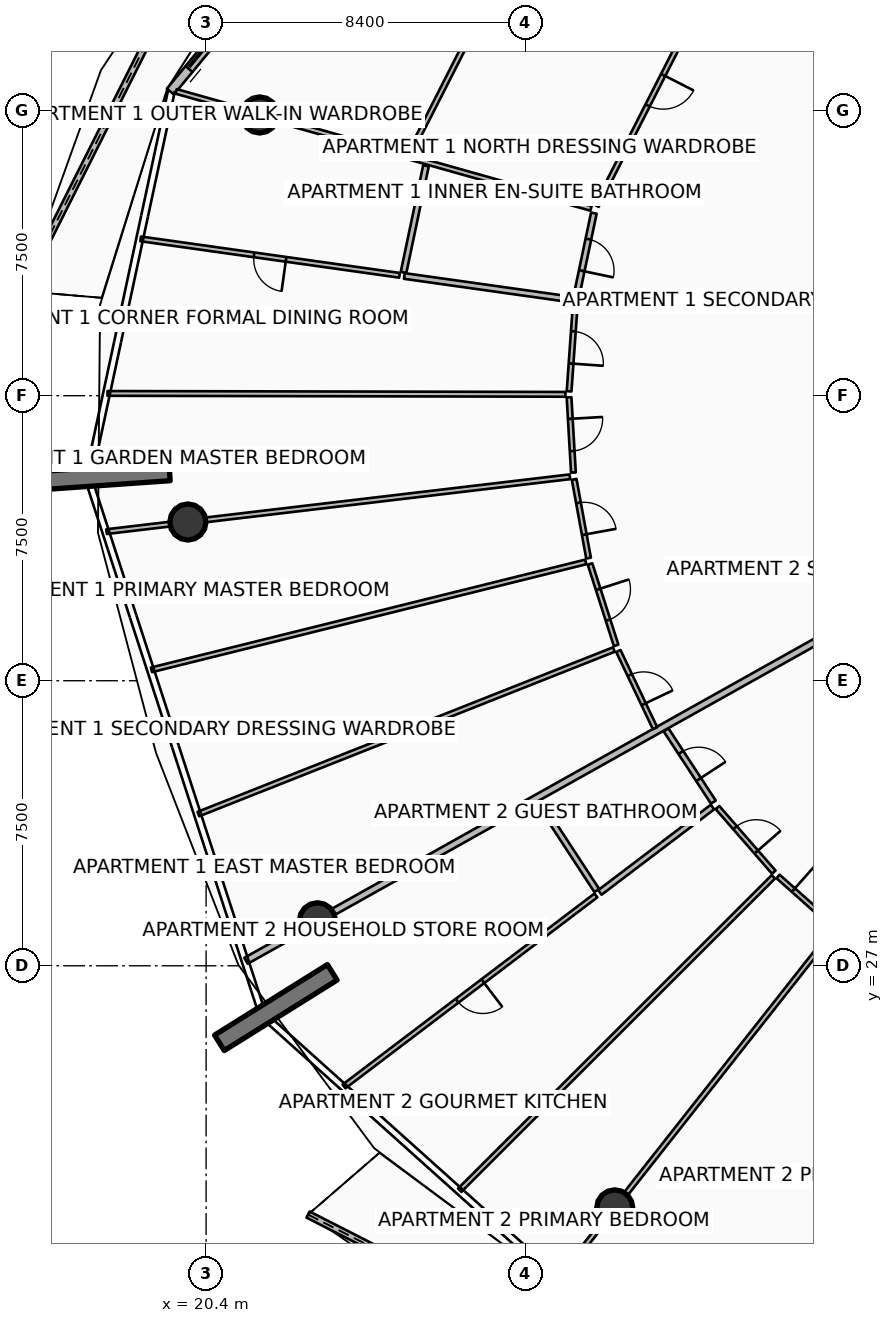
"""IFC4 building model, lengths in metres.
Left out: names, types, materials, properties, quantities, classifications, styles, units other than length and angle.
Written with IfcOpenShell. Run it as: python <this file> out.ifc"""

import sys

from ifc_helpers import new_model, si_unit, direction, frame, frame_2d, origin, origin_2d, place, context, subcontext, project, spatial, polyline, rectangle, circle, outline, extrude, element, fill, save


model = new_model("IFC4")
c1 = context("Model", 3, precision=1e-05, world=origin(), true_north=direction((0.0, 1.0)))
c2 = subcontext(c1, "Body", "Model", "MODEL_VIEW")
j1 = project(units=[si_unit("LENGTHUNIT", "METRE"), si_unit("PLANEANGLEUNIT", "RADIAN")], contexts=[c1])
p1 = place(None, origin())
s1 = spatial("IfcSite", under=j1, at=p1, CompositionType="ELEMENT")
p2 = place(p1, origin())
s2 = spatial("IfcBuilding", under=s1, at=p2, CompositionType="ELEMENT")
p3 = place(p2, frame((0.0, 0.0, 252.1)))
s3 = spatial("IfcBuildingStorey", under=s2, at=p3, CompositionType="ELEMENT", Elevation=252.1)
p4 = place(p3, frame((19.438, 40.003, 0.0), z_axis=(0.0, 0.0, 1.0), x_axis=(-0.997563824095, -0.069759707979, 0.0)))
e1 = element("IfcWall", 1, at=p4, inside=s3, PredefinedType="SOLIDWALL", context=c2, shape_type="SweptSolid", body=[
    extrude(rectangle(XDim=3.5, YDim=0.48, at=frame_2d((1.75, 0.0))), origin(), (0.0, 0.0, 1.0), 3.85),
])
p5 = place(p3, frame((23.719, 26.827, 0.0), z_axis=(0.0, 0.0, 1.0), x_axis=(-0.848033572426, -0.529942506352, 0.0)))
e2 = element("IfcWall", 2, at=p5, inside=s3, PredefinedType="SOLIDWALL", context=c2, shape_type="SweptSolid", body=[
    extrude(rectangle(XDim=3.5, YDim=0.48, at=frame_2d((1.75, 0.0))), origin(), (0.0, 0.0, 1.0), 3.85),
])
for number, where, z_axis, x_axis in (
    (3, (21.809, 49.387, 0.0), (0.0, 0.0, 1.0), (1.0, 0.0, 0.0)),
    (4, (19.92, 38.677, 0.0), (0.0, 0.0, 1.0), (1.0, 0.0, 0.0)),
    (5, (23.33, 28.184, 0.0), (0.0, 0.0, 1.0), (1.0, 0.0, 0.0)),
    (6, (31.153, 20.629, 0.0), (0.0, 0.0, 1.0), (1.0, 0.0, 0.0)),
):
    element("IfcColumn", number, at=place(p3, frame(where, z_axis=z_axis, x_axis=x_axis)), inside=s3, PredefinedType="COLUMN", context=c2, shape_type="SweptSolid", body=[
        extrude(circle(Radius=0.475, at=origin_2d()), origin(), (0.0, 0.0, 1.0), 3.59),
    ])
p6 = place(p3, frame((21.009, 55.618, 0.0), z_axis=(0.0, 0.0, 1.0), x_axis=(-0.449276289184, -0.893392867655, 0.0)))
e7 = element("IfcWall", 7, at=p6, inside=s3, PredefinedType="PARAPET", context=c2, shape_type="SweptSolid", body=[
    extrude(outline(polyline([(0.0, 0.0), (12.16, 0.0), (12.16, 1.483), (6.08, 1.284), (0.0, 1.148), (0.0, 0.0)])), frame((0.0, 0.09, 0.0), z_axis=(0.0, -1.0, 0.0), x_axis=(1.0, 0.0, 0.0)), (0.0, 0.0, 1.0), 0.18),
])
p7 = place(p3, frame((23.083, 20.454, 0.0), z_axis=(0.0, 0.0, 1.0), x_axis=(0.890886303028, -0.454226369861, 0.0)))
e8 = element("IfcWall", 8, at=p7, inside=s3, PredefinedType="PARAPET", context=c2, shape_type="SweptSolid", body=[
    extrude(outline(polyline([(0.0, 0.0), (12.3, 0.0), (12.3, 1.348), (6.15, 1.562), (0.0, 1.747), (0.0, 0.0)])), frame((0.0, 0.09, 0.0), z_axis=(0.0, -1.0, 0.0), x_axis=(1.0, 0.0, 0.0)), (0.0, 0.0, 1.0), 0.18),
])
p8 = place(p3, frame((26.742, 58.822, 0.0), z_axis=(0.0, 0.0, 1.0), x_axis=(-0.636680093065, -0.771128043255, 0.0)))
e9 = element("IfcWall", 9, at=p8, inside=s3, PredefinedType="SOLIDWALL", context=c2, shape_type="SweptSolid", body=[
    extrude(rectangle(XDim=11.438, YDim=0.24, at=frame_2d((5.719, 0.0))), origin(), (0.0, 0.0, 1.0), 2.54),
])
p9 = place(p8, frame((9.218, 0.0, 0.0)))
e10 = element("IfcOpeningElement", 10, at=p9, cuts=e9, PredefinedType="OPENING", context=c2, shape_type="SweptSolid", body=[
    extrude(rectangle(XDim=1.45, YDim=2.15, at=frame_2d((0.725, 1.075))), frame((0.0, 0.13, 0.0), z_axis=(0.0, -1.0, 0.0), x_axis=(1.0, 0.0, 0.0)), (0.0, 0.0, 1.0), 0.26),
])
p10 = place(p8, frame((0.28, 0.0, 0.65)))
e11 = element("IfcOpeningElement", 11, at=p10, cuts=e9, PredefinedType="OPENING", context=c2, shape_type="SweptSolid", body=[
    extrude(rectangle(XDim=1.6, YDim=1.5, at=frame_2d((0.8, 0.75))), frame((0.0, 0.13, 0.0), z_axis=(0.0, -1.0, 0.0), x_axis=(1.0, 0.0, 0.0)), (0.0, 0.0, 1.0), 0.26),
])
p11 = place(p3, frame((37.054, 35.87, 0.0), z_axis=(0.0, 0.0, 1.0), x_axis=(-0.872490186067, -0.488631635506, 0.0)))
e12 = element("IfcWall", 12, at=p11, inside=s3, PredefinedType="PARTITIONING", context=c2, shape_type="SweptSolid", body=[
    extrude(rectangle(XDim=17.884, YDim=0.18, at=frame_2d((8.942, 0.0))), origin(), (0.0, 0.0, 1.0), 2.957),
])
p12 = place(p3, frame((33.772, 53.079, 0.0), z_axis=(0.0, 0.0, 1.0), x_axis=(-0.454012060349, -0.890995538181, 0.0)))
e13 = element("IfcWall", 13, at=p12, inside=s3, PredefinedType="PARTITIONING", context=c2, shape_type="SweptSolid", body=[
    extrude(rectangle(XDim=6.824, YDim=0.125, at=frame_2d((3.412, 0.0))), origin(), (0.0, 0.0, 1.0), 2.957),
])
p13 = place(p12, frame((2.962, 0.0, 0.0)))
e14 = element("IfcOpeningElement", 14, at=p13, cuts=e13, PredefinedType="OPENING", context=c2, shape_type="SweptSolid", body=[
    extrude(rectangle(XDim=0.9, YDim=2.08, at=frame_2d((0.45, 1.04))), frame((0.0, 0.073, 0.0), z_axis=(0.0, -1.0, 0.0), x_axis=(1.0, 0.0, 0.0)), (0.0, 0.0, 1.0), 0.145),
])
p14 = place(p3, frame((29.764, 56.239, 0.0), z_axis=(0.0, 0.0, 1.0), x_axis=(-0.453980126594, -0.891011809494, 0.0)))
e15 = element("IfcWall", 15, at=p14, inside=s3, PredefinedType="PARTITIONING", context=c2, shape_type="SweptSolid", body=[
    extrude(rectangle(XDim=8.816, YDim=0.125, at=frame_2d((4.408, 0.0))), origin(), (0.0, 0.0, 1.0), 2.957),
])
p15 = place(p14, frame((3.958, 0.0, 0.0)))
e16 = element("IfcOpeningElement", 16, at=p15, cuts=e15, PredefinedType="OPENING", context=c2, shape_type="SweptSolid", body=[
    extrude(rectangle(XDim=0.9, YDim=2.08, at=frame_2d((0.45, 1.04))), frame((0.0, 0.073, 0.0), z_axis=(0.0, -1.0, 0.0), x_axis=(1.0, 0.0, 0.0)), (0.0, 0.0, 1.0), 0.145),
])
p16 = place(p3, frame((30.528, 46.928, 0.0), z_axis=(0.0, 0.0, 1.0), x_axis=(-0.962454146261, 0.271444315367, 0.0)))
e17 = element("IfcWall", 17, at=p16, inside=s3, PredefinedType="PARTITIONING", context=c2, shape_type="SweptSolid", body=[
    extrude(rectangle(XDim=11.342, YDim=0.125, at=frame_2d((5.671, 0.0))), origin(), (0.0, 0.0, 1.0), 2.957),
])
p17 = place(p3, frame((30.603, 46.803, 0.0), z_axis=(0.0, 0.0, 1.0), x_axis=(-0.205906433606, -0.978571683935, 0.0)))
e18 = element("IfcWall", 18, at=p17, inside=s3, PredefinedType="PARTITIONING", context=c2, shape_type="SweptSolid", body=[
    extrude(rectangle(XDim=2.247, YDim=0.15, at=frame_2d((1.124, 0.0))), origin(), (0.0, 0.0, 1.0), 2.957),
])
p18 = place(p17, frame((0.698, 0.0, 0.0)))
e19 = element("IfcOpeningElement", 19, at=p18, cuts=e18, PredefinedType="OPENING", context=c2, shape_type="SweptSolid", body=[
    extrude(rectangle(XDim=0.85, YDim=2.06, at=frame_2d((0.425, 1.03))), frame((0.0, 0.085, 0.0), z_axis=(0.0, -1.0, 0.0), x_axis=(1.0, 0.0, 0.0)), (0.0, 0.0, 1.0), 0.17),
])
p19 = place(p3, frame((26.186, 48.049, 0.0), z_axis=(0.0, 0.0, 1.0), x_axis=(-0.205851663269, -0.97858320685, 0.0)))
e20 = element("IfcWall", 20, at=p19, inside=s3, PredefinedType="PARTITIONING", context=c2, shape_type="SweptSolid", body=[
    extrude(rectangle(XDim=2.866, YDim=0.15, at=frame_2d((1.433, 0.0))), origin(), (0.0, 0.0, 1.0), 2.957),
])
p20 = place(p3, frame((30.033, 44.528, 0.0), z_axis=(0.0, 0.0, 1.0), x_axis=(-0.990248320871, 0.139313542101, 0.0)))
e21 = element("IfcWall", 21, at=p20, inside=s3, PredefinedType="PARTITIONING", context=c2, shape_type="SweptSolid", body=[
    extrude(rectangle(XDim=4.46, YDim=0.15, at=frame_2d((2.23, 0.0))), origin(), (0.0, 0.0, 1.0), 3.03),
])
p21 = place(p3, frame((25.488, 45.168, 0.0), z_axis=(0.0, 0.0, 1.0), x_axis=(-0.990239896804, 0.139373407717, 0.0)))
e22 = element("IfcWall", 22, at=p21, inside=s3, PredefinedType="PARTITIONING", context=c2, shape_type="SweptSolid", body=[
    extrude(rectangle(XDim=6.877, YDim=0.125, at=frame_2d((3.438, 0.0))), origin(), (0.0, 0.0, 1.0), 3.03),
])
p22 = place(p21, frame((3.014, 0.0, 0.0)))
e23 = element("IfcOpeningElement", 23, at=p22, cuts=e22, PredefinedType="OPENING", context=c2, shape_type="SweptSolid", body=[
    extrude(rectangle(XDim=0.85, YDim=2.06, at=frame_2d((0.425, 1.03))), frame((0.0, 0.073, 0.0), z_axis=(0.0, -1.0, 0.0), x_axis=(1.0, 0.0, 0.0)), (0.0, 0.0, 1.0), 0.145),
])
p23 = place(p3, frame((29.856, 42.036, 0.0), z_axis=(0.0, 0.0, 1.0), x_axis=(-0.999998028993, 0.001985449601, 0.0)))
e24 = element("IfcWall", 24, at=p23, inside=s3, PredefinedType="PARTITIONING", context=c2, shape_type="SweptSolid", body=[
    extrude(rectangle(XDim=12.051, YDim=0.125, at=frame_2d((6.025, 0.0))), origin(), (0.0, 0.0, 1.0), 3.03),
])
p24 = place(p3, frame((30.116, 44.426, 0.0), z_axis=(0.0, 0.0, 1.0), x_axis=(-0.07082759095, -0.997488572546, 0.0)))
e25 = element("IfcWall", 25, at=p24, inside=s3, PredefinedType="PARTITIONING", context=c2, shape_type="SweptSolid", body=[
    extrude(rectangle(XDim=2.316, YDim=0.125, at=frame_2d((1.158, 0.0))), origin(), (0.0, 0.0, 1.0), 3.03),
])
p25 = place(p24, frame((0.733, 0.0, 0.0)))
e26 = element("IfcOpeningElement", 26, at=p25, cuts=e25, PredefinedType="OPENING", context=c2, shape_type="SweptSolid", body=[
    extrude(rectangle(XDim=0.85, YDim=2.06, at=frame_2d((0.425, 1.03))), frame((0.0, 0.073, 0.0), z_axis=(0.0, -1.0, 0.0), x_axis=(1.0, 0.0, 0.0)), (0.0, 0.0, 1.0), 0.145),
])
p26 = place(p3, frame((29.951, 41.956, 0.0), z_axis=(0.0, 0.0, 1.0), x_axis=(0.057790197943, -0.998328749973, 0.0)))
e27 = element("IfcWall", 27, at=p26, inside=s3, PredefinedType="PARTITIONING", context=c2, shape_type="SweptSolid", body=[
    extrude(rectangle(XDim=1.981, YDim=0.125, at=frame_2d((0.991, 0.0))), origin(), (0.0, 0.0, 1.0), 2.957),
])
p27 = place(p26, frame((0.566, 0.0, 0.0)))
e28 = element("IfcOpeningElement", 28, at=p27, cuts=e27, PredefinedType="OPENING", context=c2, shape_type="SweptSolid", body=[
    extrude(rectangle(XDim=0.85, YDim=2.06, at=frame_2d((0.425, 1.03))), frame((0.0, 0.073, 0.0), z_axis=(0.0, -1.0, 0.0), x_axis=(1.0, 0.0, 0.0)), (0.0, 0.0, 1.0), 0.145),
])
p28 = place(p3, frame((29.972, 39.866, 0.0), z_axis=(0.0, 0.0, 1.0), x_axis=(-0.993068089356, -0.117540503246, 0.0)))
e29 = element("IfcWall", 29, at=p28, inside=s3, PredefinedType="PARTITIONING", context=c2, shape_type="SweptSolid", body=[
    extrude(rectangle(XDim=12.276, YDim=0.125, at=frame_2d((6.138, 0.0))), origin(), (0.0, 0.0, 1.0), 2.957),
])
p29 = place(p3, frame((30.391, 37.626, 0.0), z_axis=(0.0, 0.0, 1.0), x_axis=(-0.970503640625, -0.24108646485, 0.0)))
e30 = element("IfcWall", 30, at=p29, inside=s3, PredefinedType="PARTITIONING", context=c2, shape_type="SweptSolid", body=[
    extrude(rectangle(XDim=11.775, YDim=0.125, at=frame_2d((5.888, 0.0))), origin(), (0.0, 0.0, 1.0), 3.03),
])
p30 = place(p3, frame((31.13, 35.321, 0.0), z_axis=(0.0, 0.0, 1.0), x_axis=(-0.929773898428, -0.368131087796, 0.0)))
e31 = element("IfcWall", 31, at=p30, inside=s3, PredefinedType="PARTITIONING", context=c2, shape_type="SweptSolid", body=[
    extrude(rectangle(XDim=11.76, YDim=0.125, at=frame_2d((5.88, 0.0))), origin(), (0.0, 0.0, 1.0), 3.03),
])
p31 = place(p3, frame((30.085, 39.799, 0.0), z_axis=(0.0, 0.0, 1.0), x_axis=(0.179690800857, -0.983723139957, 0.0)))
e32 = element("IfcWall", 32, at=p31, inside=s3, PredefinedType="PARTITIONING", context=c2, shape_type="SweptSolid", body=[
    extrude(rectangle(XDim=2.107, YDim=0.125, at=frame_2d((1.054, 0.0))), origin(), (0.0, 0.0, 1.0), 2.957),
])
p32 = place(p31, frame((0.629, 0.0, 0.0)))
e33 = element("IfcOpeningElement", 33, at=p32, cuts=e32, PredefinedType="OPENING", context=c2, shape_type="SweptSolid", body=[
    extrude(rectangle(XDim=0.85, YDim=2.06, at=frame_2d((0.425, 1.03))), frame((0.0, 0.073, 0.0), z_axis=(0.0, -1.0, 0.0), x_axis=(1.0, 0.0, 0.0)), (0.0, 0.0, 1.0), 0.145),
])
p33 = place(p3, frame((30.503, 37.571, 0.0), z_axis=(0.0, 0.0, 1.0), x_axis=(0.305327243998, -0.952247485727, 0.0)))
e34 = element("IfcWall", 34, at=p33, inside=s3, PredefinedType="PARTITIONING", context=c2, shape_type="SweptSolid", body=[
    extrude(rectangle(XDim=2.249, YDim=0.125, at=frame_2d((1.124, 0.0))), origin(), (0.0, 0.0, 1.0), 3.03),
])
p34 = place(p33, frame((0.699, 0.0, 0.0)))
e35 = element("IfcOpeningElement", 35, at=p34, cuts=e34, PredefinedType="OPENING", context=c2, shape_type="SweptSolid", body=[
    extrude(rectangle(XDim=0.85, YDim=2.06, at=frame_2d((0.425, 1.03))), frame((0.0, 0.073, 0.0), z_axis=(0.0, -1.0, 0.0), x_axis=(1.0, 0.0, 0.0)), (0.0, 0.0, 1.0), 0.145),
])
p35 = place(p3, frame((31.248, 35.281, 0.0), z_axis=(0.0, 0.0, 1.0), x_axis=(0.429406696771, -0.903111227241, 0.0)))
e36 = element("IfcWall", 36, at=p35, inside=s3, PredefinedType="PARTITIONING", context=c2, shape_type="SweptSolid", body=[
    extrude(rectangle(XDim=2.249, YDim=0.125, at=frame_2d((1.124, 0.0))), origin(), (0.0, 0.0, 1.0), 2.957),
])
p36 = place(p35, frame((0.699, 0.0, 0.0)))
e37 = element("IfcOpeningElement", 37, at=p36, cuts=e36, PredefinedType="OPENING", context=c2, shape_type="SweptSolid", body=[
    extrude(rectangle(XDim=0.85, YDim=2.06, at=frame_2d((0.425, 1.03))), frame((0.0, 0.073, 0.0), z_axis=(0.0, -1.0, 0.0), x_axis=(1.0, 0.0, 0.0)), (0.0, 0.0, 1.0), 0.145),
])
p37 = place(p3, frame((36.903, 27.924, 0.0), z_axis=(0.0, 0.0, 1.0), x_axis=(-0.619090039254, -0.785320013304, 0.0)))
e38 = element("IfcWall", 38, at=p37, inside=s3, PredefinedType="PARTITIONING", context=c2, shape_type="SweptSolid", body=[
    extrude(rectangle(XDim=11.672, YDim=0.125, at=frame_2d((5.836, 0.0))), origin(), (0.0, 0.0, 1.0), 2.957),
])
p38 = place(p3, frame((32.503, 33.207, 0.0), z_axis=(0.0, 0.0, 1.0), x_axis=(0.54776176335, -0.836634358972, 0.0)))
e39 = element("IfcWall", 39, at=p38, inside=s3, PredefinedType="PARTITIONING", context=c2, shape_type="SweptSolid", body=[
    extrude(rectangle(XDim=2.272, YDim=0.15, at=frame_2d((1.136, 0.0))), origin(), (0.0, 0.0, 1.0), 2.957),
])
p39 = place(p38, frame((0.711, 0.0, 0.0)))
e40 = element("IfcOpeningElement", 40, at=p39, cuts=e39, PredefinedType="OPENING", context=c2, shape_type="SweptSolid", body=[
    extrude(rectangle(XDim=0.85, YDim=2.06, at=frame_2d((0.425, 1.03))), frame((0.0, 0.085, 0.0), z_axis=(0.0, -1.0, 0.0), x_axis=(1.0, 0.0, 0.0)), (0.0, 0.0, 1.0), 0.17),
])
p40 = place(p3, frame((29.144, 31.326, 0.0), z_axis=(0.0, 0.0, 1.0), x_axis=(0.547727893033, -0.836656533587, 0.0)))
e41 = element("IfcWall", 41, at=p40, inside=s3, PredefinedType="PARTITIONING", context=c2, shape_type="SweptSolid", body=[
    extrude(rectangle(XDim=2.804, YDim=0.15, at=frame_2d((1.402, 0.0))), origin(), (0.0, 0.0, 1.0), 2.957),
])
p41 = place(p3, frame((33.725, 31.177, 0.0), z_axis=(0.0, 0.0, 1.0), x_axis=(-0.796854692537, -0.604171001441, 0.0)))
e42 = element("IfcWall", 42, at=p41, inside=s3, PredefinedType="PARTITIONING", context=c2, shape_type="SweptSolid", body=[
    extrude(rectangle(XDim=3.72, YDim=0.15, at=frame_2d((1.86, 0.0))), origin(), (0.0, 0.0, 1.0), 3.03),
])
p42 = place(p3, frame((30.657, 28.851, 0.0), z_axis=(0.0, 0.0, 1.0), x_axis=(-0.796843780875, -0.604185392807, 0.0)))
e43 = element("IfcWall", 43, at=p42, inside=s3, PredefinedType="PARTITIONING", context=c2, shape_type="SweptSolid", body=[
    extrude(rectangle(XDim=8.318, YDim=0.125, at=frame_2d((4.159, 0.0))), origin(), (0.0, 0.0, 1.0), 3.03),
])
p43 = place(p42, frame((3.734, 0.0, 0.0)))
e44 = element("IfcOpeningElement", 44, at=p43, cuts=e43, PredefinedType="OPENING", context=c2, shape_type="SweptSolid", body=[
    extrude(rectangle(XDim=0.85, YDim=2.06, at=frame_2d((0.425, 1.03))), frame((0.0, 0.073, 0.0), z_axis=(0.0, -1.0, 0.0), x_axis=(1.0, 0.0, 0.0)), (0.0, 0.0, 1.0), 0.145),
])
p44 = place(p3, frame((35.326, 29.34, 0.0), z_axis=(0.0, 0.0, 1.0), x_axis=(-0.707472916484, -0.706740456208, 0.0)))
e45 = element("IfcWall", 45, at=p44, inside=s3, PredefinedType="PARTITIONING", context=c2, shape_type="SweptSolid", body=[
    extrude(rectangle(XDim=11.666, YDim=0.125, at=frame_2d((5.833, 0.0))), origin(), (0.0, 0.0, 1.0), 3.03),
])
p45 = place(p3, frame((33.856, 31.163, 0.0), z_axis=(0.0, 0.0, 1.0), x_axis=(0.656985315096, -0.753903372952, 0.0)))
e46 = element("IfcWall", 46, at=p45, inside=s3, PredefinedType="PARTITIONING", context=c2, shape_type="SweptSolid", body=[
    extrude(rectangle(XDim=2.255, YDim=0.125, at=frame_2d((1.127, 0.0))), origin(), (0.0, 0.0, 1.0), 3.03),
])
p46 = place(p45, frame((0.702, 0.0, 0.0)))
e47 = element("IfcOpeningElement", 47, at=p46, cuts=e46, PredefinedType="OPENING", context=c2, shape_type="SweptSolid", body=[
    extrude(rectangle(XDim=0.85, YDim=2.06, at=frame_2d((0.425, 1.03))), frame((0.0, 0.073, 0.0), z_axis=(0.0, -1.0, 0.0), x_axis=(1.0, 0.0, 0.0)), (0.0, 0.0, 1.0), 0.145),
])
p47 = place(p3, frame((35.45, 29.35, 0.0), z_axis=(0.0, 0.0, 1.0), x_axis=(0.747360411924, -0.664418854857, 0.0)))
e48 = element("IfcWall", 48, at=p47, inside=s3, PredefinedType="PARTITIONING", context=c2, shape_type="SweptSolid", body=[
    extrude(rectangle(XDim=1.928, YDim=0.125, at=frame_2d((0.964, 0.0))), origin(), (0.0, 0.0, 1.0), 2.957),
])
p48 = place(p47, frame((0.539, 0.0, 0.0)))
e49 = element("IfcOpeningElement", 49, at=p48, cuts=e48, PredefinedType="OPENING", context=c2, shape_type="SweptSolid", body=[
    extrude(rectangle(XDim=0.85, YDim=2.06, at=frame_2d((0.425, 1.03))), frame((0.0, 0.073, 0.0), z_axis=(0.0, -1.0, 0.0), x_axis=(1.0, 0.0, 0.0)), (0.0, 0.0, 1.0), 0.145),
])
p49 = place(p9, origin())
e50 = element("IfcDoor", 50, at=p49, inside=s3, OperationType="DOUBLE_DOOR_SLIDING", PredefinedType="DOOR", context=c2, shape_type="SweptSolid", body=[
    extrude(rectangle(XDim=1.45, YDim=2.15, at=frame_2d((0.725, 1.075))), frame((0.0, 0.025, 0.0), z_axis=(0.0, -1.0, 0.0), x_axis=(1.0, 0.0, 0.0)), (0.0, 0.0, 1.0), 0.05),
])
fill(e10, e50)
p50 = place(p13, origin())
e51 = element("IfcDoor", 51, at=p50, inside=s3, OperationType="SINGLE_SWING_LEFT", PredefinedType="DOOR", context=c2, shape_type="SweptSolid", body=[
    extrude(rectangle(XDim=0.9, YDim=2.08, at=frame_2d((0.45, 1.04))), frame((0.0, 0.025, 0.0), z_axis=(0.0, -1.0, 0.0), x_axis=(1.0, 0.0, 0.0)), (0.0, 0.0, 1.0), 0.05),
])
fill(e14, e51)
p51 = place(p18, origin())
e52 = element("IfcDoor", 52, at=p51, inside=s3, OperationType="SINGLE_SWING_RIGHT", PredefinedType="DOOR", context=c2, shape_type="SweptSolid", body=[
    extrude(rectangle(XDim=0.85, YDim=2.06, at=frame_2d((0.425, 1.03))), frame((0.0, 0.025, 0.0), z_axis=(0.0, -1.0, 0.0), x_axis=(1.0, 0.0, 0.0)), (0.0, 0.0, 1.0), 0.05),
])
fill(e19, e52)
p52 = place(p22, origin())
e53 = element("IfcDoor", 53, at=p52, inside=s3, OperationType="SINGLE_SWING_LEFT", PredefinedType="DOOR", context=c2, shape_type="SweptSolid", body=[
    extrude(rectangle(XDim=0.85, YDim=2.06, at=frame_2d((0.425, 1.03))), frame((0.0, 0.025, 0.0), z_axis=(0.0, -1.0, 0.0), x_axis=(1.0, 0.0, 0.0)), (0.0, 0.0, 1.0), 0.05),
])
fill(e23, e53)
p53 = place(p25, origin())
e54 = element("IfcDoor", 54, at=p53, inside=s3, OperationType="SINGLE_SWING_RIGHT", PredefinedType="DOOR", context=c2, shape_type="SweptSolid", body=[
    extrude(rectangle(XDim=0.85, YDim=2.06, at=frame_2d((0.425, 1.03))), frame((0.0, 0.025, 0.0), z_axis=(0.0, -1.0, 0.0), x_axis=(1.0, 0.0, 0.0)), (0.0, 0.0, 1.0), 0.05),
])
fill(e26, e54)
p54 = place(p27, origin())
e55 = element("IfcDoor", 55, at=p54, inside=s3, OperationType="SINGLE_SWING_LEFT", PredefinedType="DOOR", context=c2, shape_type="SweptSolid", body=[
    extrude(rectangle(XDim=0.85, YDim=2.06, at=frame_2d((0.425, 1.03))), frame((0.0, 0.025, 0.0), z_axis=(0.0, -1.0, 0.0), x_axis=(1.0, 0.0, 0.0)), (0.0, 0.0, 1.0), 0.05),
])
fill(e28, e55)
p55 = place(p32, origin())
e56 = element("IfcDoor", 56, at=p55, inside=s3, OperationType="SINGLE_SWING_RIGHT", PredefinedType="DOOR", context=c2, shape_type="SweptSolid", body=[
    extrude(rectangle(XDim=0.85, YDim=2.06, at=frame_2d((0.425, 1.03))), frame((0.0, 0.025, 0.0), z_axis=(0.0, -1.0, 0.0), x_axis=(1.0, 0.0, 0.0)), (0.0, 0.0, 1.0), 0.05),
])
fill(e33, e56)
p56 = place(p34, origin())
e57 = element("IfcDoor", 57, at=p56, inside=s3, OperationType="SINGLE_SWING_LEFT", PredefinedType="DOOR", context=c2, shape_type="SweptSolid", body=[
    extrude(rectangle(XDim=0.85, YDim=2.06, at=frame_2d((0.425, 1.03))), frame((0.0, 0.025, 0.0), z_axis=(0.0, -1.0, 0.0), x_axis=(1.0, 0.0, 0.0)), (0.0, 0.0, 1.0), 0.05),
])
fill(e35, e57)
p57 = place(p36, origin())
e58 = element("IfcDoor", 58, at=p57, inside=s3, OperationType="SINGLE_SWING_RIGHT", PredefinedType="DOOR", context=c2, shape_type="SweptSolid", body=[
    extrude(rectangle(XDim=0.85, YDim=2.06, at=frame_2d((0.425, 1.03))), frame((0.0, 0.025, 0.0), z_axis=(0.0, -1.0, 0.0), x_axis=(1.0, 0.0, 0.0)), (0.0, 0.0, 1.0), 0.05),
])
fill(e37, e58)
p58 = place(p39, origin())
e59 = element("IfcDoor", 59, at=p58, inside=s3, OperationType="SINGLE_SWING_RIGHT", PredefinedType="DOOR", context=c2, shape_type="SweptSolid", body=[
    extrude(rectangle(XDim=0.85, YDim=2.06, at=frame_2d((0.425, 1.03))), frame((0.0, 0.025, 0.0), z_axis=(0.0, -1.0, 0.0), x_axis=(1.0, 0.0, 0.0)), (0.0, 0.0, 1.0), 0.05),
])
fill(e40, e59)
p59 = place(p43, origin())
e60 = element("IfcDoor", 60, at=p59, inside=s3, OperationType="SINGLE_SWING_LEFT", PredefinedType="DOOR", context=c2, shape_type="SweptSolid", body=[
    extrude(rectangle(XDim=0.85, YDim=2.06, at=frame_2d((0.425, 1.03))), frame((0.0, 0.025, 0.0), z_axis=(0.0, -1.0, 0.0), x_axis=(1.0, 0.0, 0.0)), (0.0, 0.0, 1.0), 0.05),
])
fill(e44, e60)
p60 = place(p46, origin())
e61 = element("IfcDoor", 61, at=p60, inside=s3, OperationType="SINGLE_SWING_RIGHT", PredefinedType="DOOR", context=c2, shape_type="SweptSolid", body=[
    extrude(rectangle(XDim=0.85, YDim=2.06, at=frame_2d((0.425, 1.03))), frame((0.0, 0.025, 0.0), z_axis=(0.0, -1.0, 0.0), x_axis=(1.0, 0.0, 0.0)), (0.0, 0.0, 1.0), 0.05),
])
fill(e47, e61)
p61 = place(p48, origin())
e62 = element("IfcDoor", 62, at=p61, inside=s3, OperationType="SINGLE_SWING_LEFT", PredefinedType="DOOR", context=c2, shape_type="SweptSolid", body=[
    extrude(rectangle(XDim=0.85, YDim=2.06, at=frame_2d((0.425, 1.03))), frame((0.0, 0.025, 0.0), z_axis=(0.0, -1.0, 0.0), x_axis=(1.0, 0.0, 0.0)), (0.0, 0.0, 1.0), 0.05),
])
fill(e49, e62)
save(model, sys.argv[1])
